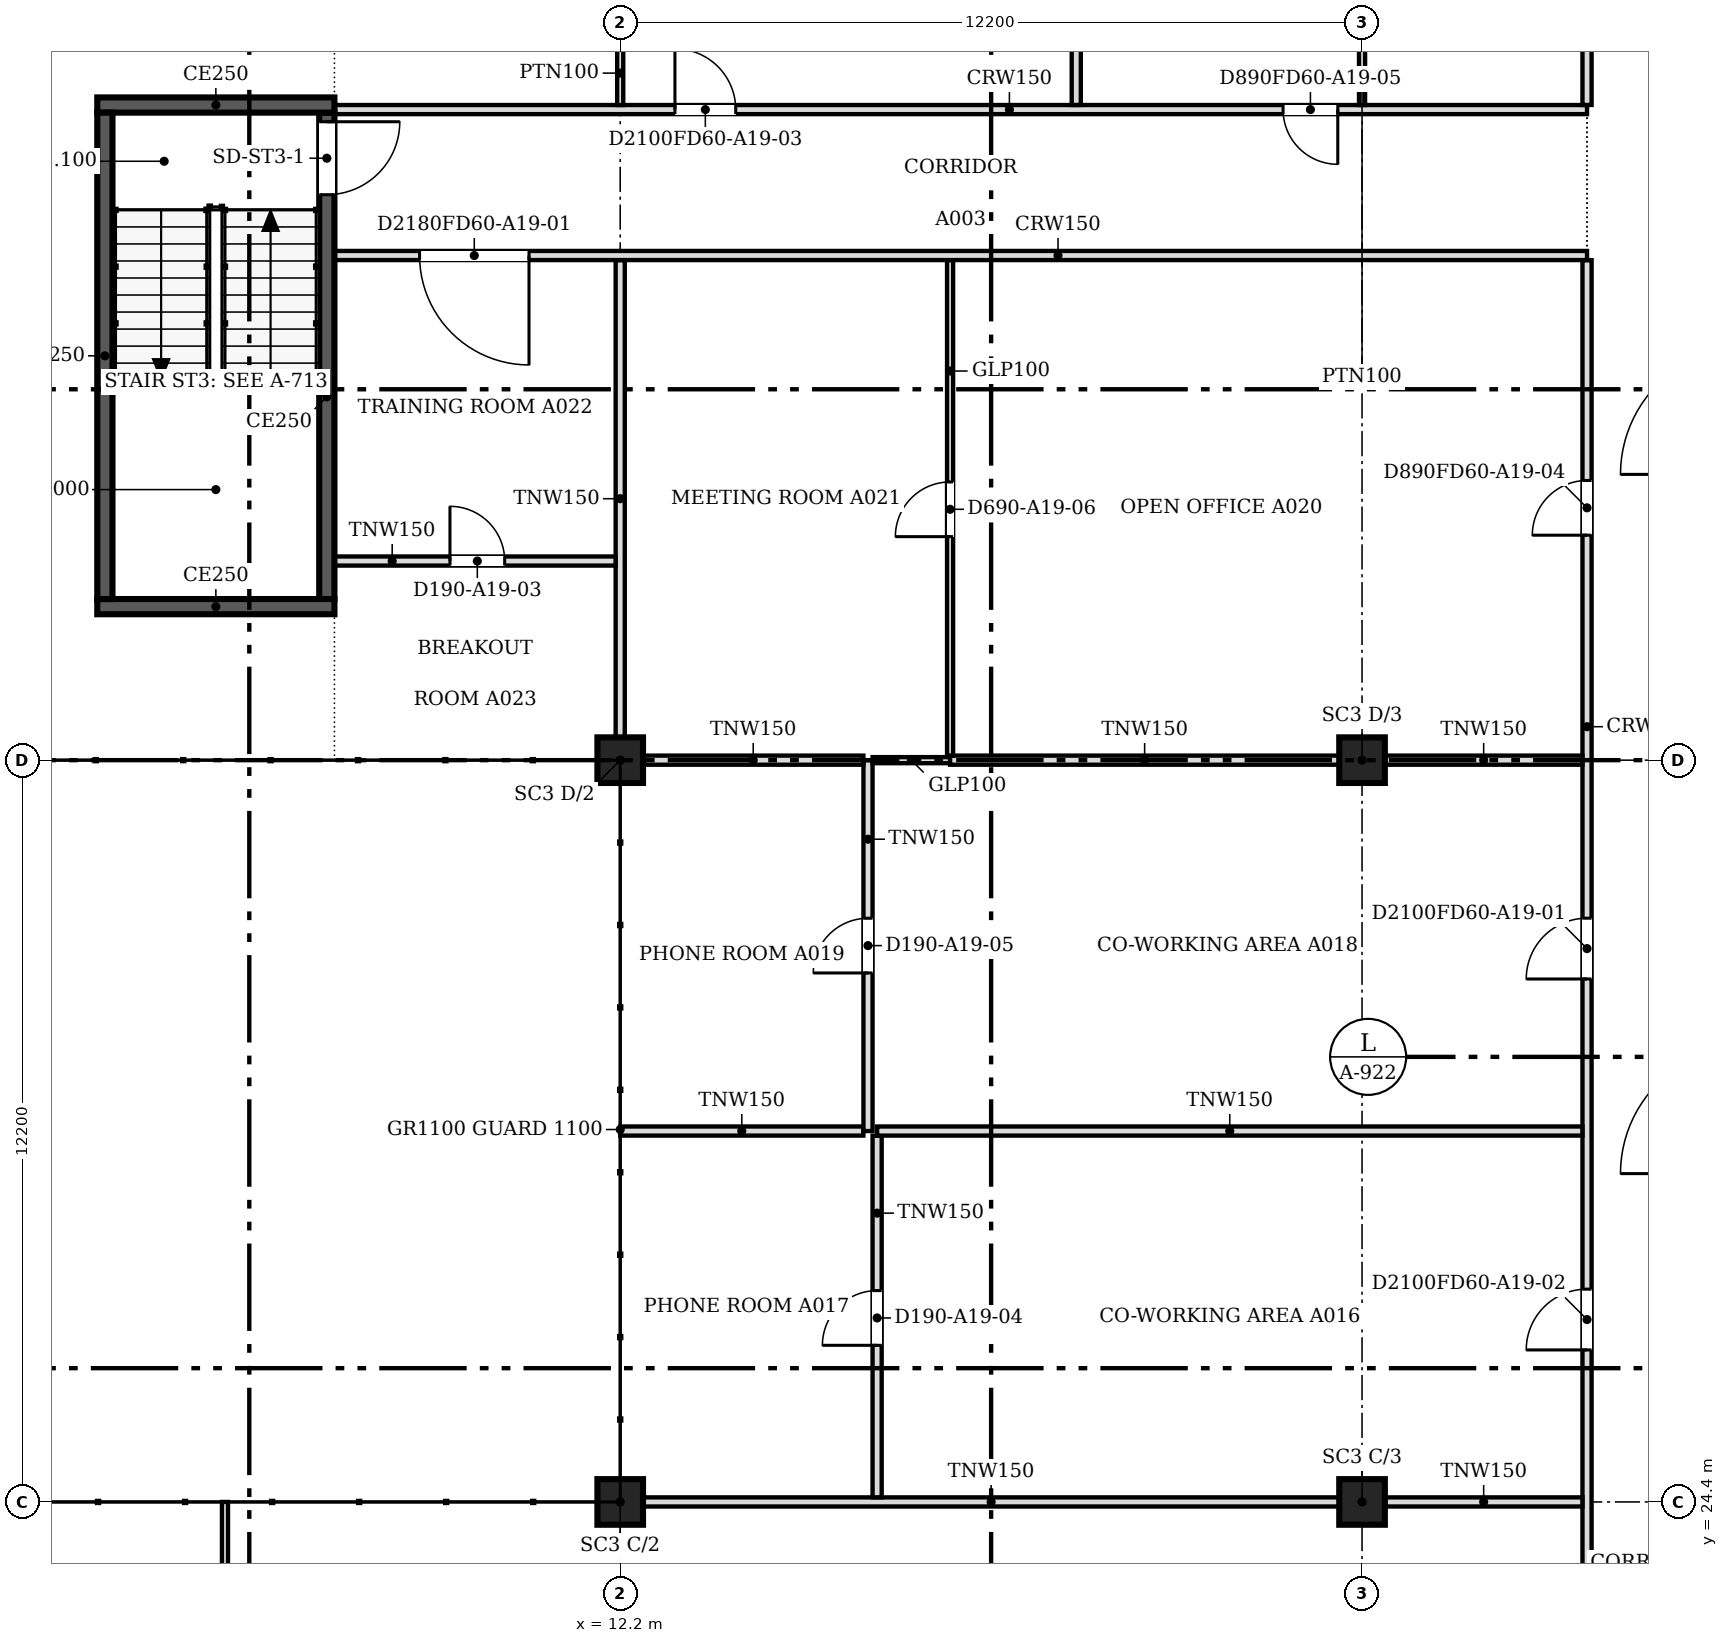
"""IFC4 building model, lengths in metres.
Left out: names, types, materials, properties, quantities, classifications, styles, units other than length and angle.
Written with IfcOpenShell. Run it as: python <this file> out.ifc"""

import sys

from ifc_helpers import new_model, si_unit, direction, frame, frame_2d, origin, origin_2d, place, context, subcontext, project, spatial, rectangle, extrude, source, transform, mapped, element, fill, save


model = new_model("IFC4")
c1 = context("Model", 3, precision=1e-05, world=origin(), true_north=direction((0.0, 1.0)))
c2 = subcontext(c1, "Body", "Model", "MODEL_VIEW")
j1 = project(units=[si_unit("LENGTHUNIT", "METRE"), si_unit("PLANEANGLEUNIT", "RADIAN")], contexts=[c1])
p1 = place(None, origin())
s1 = spatial("IfcSite", under=j1, at=p1, CompositionType="ELEMENT")
p2 = place(p1, origin())
s2 = spatial("IfcBuilding", under=s1, at=p2, CompositionType="ELEMENT")
p3 = place(p2, frame((0.0, 0.0, 209.3)))
s3 = spatial("IfcBuildingStorey", under=s2, at=p3, CompositionType="ELEMENT", Elevation=209.3)
for number, where, z_axis, x_axis in (
    (1, (12.2, 24.4, 0.0), (0.0, 0.0, 1.0), (1.0, 0.0, 0.0)),
    (2, (12.2, 36.6, 0.0), (0.0, 0.0, 1.0), (1.0, 0.0, 0.0)),
    (3, (24.4, 24.4, 0.0), (0.0, 0.0, 1.0), (1.0, 0.0, 0.0)),
    (4, (24.4, 36.6, 0.0), (0.0, 0.0, 1.0), (1.0, 0.0, 0.0)),
):
    element("IfcColumn", number, at=place(p3, frame(where, z_axis=z_axis, x_axis=x_axis)), inside=s3, PredefinedType="COLUMN", context=c2, shape_type="SweptSolid", body=[
        extrude(rectangle(XDim=0.75, YDim=0.75, at=origin_2d()), origin(), (0.0, 0.0, 1.0), 3.6),
    ])
p4 = place(p3, frame((7.5, 39.125, 0.0), z_axis=(0.0, 0.0, 1.0), x_axis=(-1.0, 0.0, 0.0)))
e5 = element("IfcWall", 5, at=p4, inside=s3, PredefinedType="SOLIDWALL", context=c2, shape_type="SweptSolid", body=[
    extrude(rectangle(XDim=3.9, YDim=0.25, at=frame_2d((1.95, 0.0))), origin(), (0.0, 0.0, 1.0), 3.8),
])
p5 = place(p3, frame((3.725, 39.25, 0.0), z_axis=(0.0, 0.0, 1.0), x_axis=(0.0, 1.0, 0.0)))
e6 = element("IfcWall", 6, at=p5, inside=s3, PredefinedType="SOLIDWALL", context=c2, shape_type="SweptSolid", body=[
    extrude(rectangle(XDim=8.0, YDim=0.25, at=frame_2d((4.0, 0.0))), origin(), (0.0, 0.0, 1.0), 3.8),
])
p6 = place(p3, frame((3.6, 47.375, 0.0), z_axis=(0.0, 0.0, 1.0), x_axis=(1.0, 0.0, 0.0)))
e7 = element("IfcWall", 7, at=p6, inside=s3, PredefinedType="SOLIDWALL", context=c2, shape_type="SweptSolid", body=[
    extrude(rectangle(XDim=3.9, YDim=0.25, at=frame_2d((1.95, 0.0))), origin(), (0.0, 0.0, 1.0), 3.8),
])
p7 = place(p3, frame((7.375, 47.25, 0.0), z_axis=(0.0, 0.0, 1.0), x_axis=(0.0, -1.0, 0.0)))
e8 = element("IfcWall", 8, at=p7, inside=s3, PredefinedType="SOLIDWALL", context=c2, shape_type="SweptSolid", body=[
    extrude(rectangle(XDim=8.0, YDim=0.25, at=frame_2d((4.0, 0.0))), origin(), (0.0, 0.0, 1.0), 3.8),
])
m1 = source(origin(), c2, "Body", "SweptSolid", [
    extrude(rectangle(XDim=1.2, YDim=2.1, at=frame_2d((0.6, 1.05))), frame((0.0, 0.135, 0.0), z_axis=(0.0, -1.0, 0.0), x_axis=(1.0, 0.0, 0.0)), (0.0, 0.0, 1.0), 0.27),
])
p8 = place(p7, frame((0.15, 0.0, 0.0)))
e9 = element("IfcOpeningElement", 9, at=p8, cuts=e8, PredefinedType="OPENING", context=c2, shape_type="MappedRepresentation", body=[
    mapped(m1, transform((0.0, 0.0, 0.0), scale=1.0)),
])
p9 = place(p3, frame((28.1, 18.8, 0.0), z_axis=(0.0, 0.0, 1.0), x_axis=(0.0, 1.0, 0.0)))
e10 = element("IfcWall", 10, at=p9, inside=s3, PredefinedType="PARTITIONING", context=c2, shape_type="SweptSolid", body=[
    extrude(rectangle(XDim=26.024, YDim=0.15, at=frame_2d((13.012, 0.0))), origin(), (0.0, 0.0, 1.0), 3.067),
])
m2 = source(origin(), c2, "Body", "SweptSolid", [
    extrude(rectangle(XDim=0.9, YDim=2.1, at=frame_2d((0.45, 1.05))), frame((0.0, 0.085, 0.0), z_axis=(0.0, -1.0, 0.0), x_axis=(1.0, 0.0, 0.0)), (0.0, 0.0, 1.0), 0.17),
])
p10 = place(p9, frame((1.1, 0.0, 0.0)))
e11 = element("IfcOpeningElement", 11, at=p10, cuts=e10, PredefinedType="OPENING", context=c2, shape_type="MappedRepresentation", body=[
    mapped(m2, transform((0.0, 0.0, 0.0), scale=1.0)),
])
m3 = source(origin(), c2, "Body", "SweptSolid", [
    extrude(rectangle(XDim=1.0, YDim=2.1, at=frame_2d((0.5, 1.05))), frame((0.0, 0.085, 0.0), z_axis=(0.0, -1.0, 0.0), x_axis=(1.0, 0.0, 0.0)), (0.0, 0.0, 1.0), 0.17),
])
p11 = place(p9, frame((14.201, 0.0, 0.0)))
e12 = element("IfcOpeningElement", 12, at=p11, cuts=e10, PredefinedType="OPENING", context=c2, shape_type="MappedRepresentation", body=[
    mapped(m3, transform((0.0, 0.0, 0.0), scale=1.0)),
])
p12 = place(p9, frame((8.1, 0.0, 0.0)))
e13 = element("IfcOpeningElement", 13, at=p12, cuts=e10, PredefinedType="OPENING", context=c2, shape_type="MappedRepresentation", body=[
    mapped(m3, transform((0.0, 0.0, 0.0), scale=1.0)),
])
p13 = place(p9, frame((21.5, 0.0, 0.0)))
e14 = element("IfcOpeningElement", 14, at=p13, cuts=e10, PredefinedType="OPENING", context=c2, shape_type="MappedRepresentation", body=[
    mapped(m2, transform((0.0, 0.0, 0.0), scale=1.0)),
])
p14 = place(p3, frame((5.7, 18.99, 0.0), z_axis=(0.0, 0.0, 1.0), x_axis=(0.0, 1.0, 0.0)))
e15 = element("IfcWall", 15, at=p14, inside=s3, PredefinedType="PARTITIONING", context=c2, shape_type="SweptSolid", body=[
    extrude(rectangle(XDim=5.41, YDim=0.1, at=frame_2d((2.705, 0.0))), origin(), (0.0, 0.0, 1.0), 3.067),
])
m4 = source(origin(), c2, "Body", "SweptSolid", [
    extrude(rectangle(XDim=0.9, YDim=2.1, at=frame_2d((0.45, 1.05))), frame((0.0, 0.06, 0.0), z_axis=(0.0, -1.0, 0.0), x_axis=(1.0, 0.0, 0.0)), (0.0, 0.0, 1.0), 0.12),
])
p15 = place(p14, frame((2.3, 0.0, 0.0)))
e16 = element("IfcOpeningElement", 16, at=p15, cuts=e15, PredefinedType="OPENING", context=c2, shape_type="MappedRepresentation", body=[
    mapped(m4, transform((0.0, 0.0, 0.0), scale=1.0)),
])
p16 = place(p3, frame((12.576, 24.4, 0.0), z_axis=(0.0, 0.0, 1.0), x_axis=(1.0, 0.0, 0.0)))
e17 = element("IfcWall", 17, at=p16, inside=s3, PredefinedType="PARTITIONING", context=c2, shape_type="SweptSolid", body=[
    extrude(rectangle(XDim=11.448, YDim=0.15, at=frame_2d((5.724, 0.0))), origin(), (0.0, 0.0, 1.0), 3.067),
])
p17 = place(p3, frame((24.776, 24.4, 0.0), z_axis=(0.0, 0.0, 1.0), x_axis=(1.0, 0.0, 0.0)))
e18 = element("IfcWall", 18, at=p17, inside=s3, PredefinedType="PARTITIONING", context=c2, shape_type="SweptSolid", body=[
    extrude(rectangle(XDim=3.248, YDim=0.15, at=frame_2d((1.624, 0.0))), origin(), (0.0, 0.0, 1.0), 3.067),
])
p18 = place(p3, frame((16.425, 24.476, 0.0), z_axis=(0.0, 0.0, 1.0), x_axis=(0.0, 1.0, 0.0)))
e19 = element("IfcWall", 19, at=p18, inside=s3, PredefinedType="PARTITIONING", context=c2, shape_type="SweptSolid", body=[
    extrude(rectangle(XDim=5.948, YDim=0.15, at=frame_2d((2.974, 0.0))), origin(), (0.0, 0.0, 1.0), 3.067),
])
p19 = place(p18, frame((2.5, 0.0, 0.0)))
e20 = element("IfcOpeningElement", 20, at=p19, cuts=e19, PredefinedType="OPENING", context=c2, shape_type="MappedRepresentation", body=[
    mapped(m2, transform((0.0, 0.0, 0.0), scale=1.0)),
])
p20 = place(p3, frame((12.2, 30.5, 0.0), z_axis=(0.0, 0.0, 1.0), x_axis=(1.0, 0.0, 0.0)))
e21 = element("IfcWall", 21, at=p20, inside=s3, PredefinedType="PARTITIONING", context=c2, shape_type="SweptSolid", body=[
    extrude(rectangle(XDim=3.999, YDim=0.15, at=frame_2d((2.0, 0.0))), origin(), (0.0, 0.0, 1.0), 3.067),
])
p21 = place(p3, frame((16.275, 30.5, 0.0), z_axis=(0.0, 0.0, 1.0), x_axis=(0.0, 1.0, 0.0)))
e22 = element("IfcWall", 22, at=p21, inside=s3, PredefinedType="PARTITIONING", context=c2, shape_type="SweptSolid", body=[
    extrude(rectangle(XDim=6.1, YDim=0.15, at=frame_2d((3.05, 0.0))), origin(), (0.0, 0.0, 1.0), 3.067),
])
p22 = place(p21, frame((2.6, 0.0, 0.0)))
e23 = element("IfcOpeningElement", 23, at=p22, cuts=e22, PredefinedType="OPENING", context=c2, shape_type="MappedRepresentation", body=[
    mapped(m2, transform((0.0, 0.0, 0.0), scale=1.0)),
])
p23 = place(p3, frame((16.425, 30.5, 0.0), z_axis=(0.0, 0.0, 1.0), x_axis=(1.0, 0.0, 0.0)))
e24 = element("IfcWall", 24, at=p23, inside=s3, PredefinedType="PARTITIONING", context=c2, shape_type="SweptSolid", body=[
    extrude(rectangle(XDim=11.599, YDim=0.15, at=frame_2d((5.799, 0.0))), origin(), (0.0, 0.0, 1.0), 3.067),
])
p24 = place(p3, frame((12.576, 36.6, 0.0), z_axis=(0.0, 0.0, 1.0), x_axis=(1.0, 0.0, 0.0)))
e25 = element("IfcWall", 25, at=p24, inside=s3, PredefinedType="PARTITIONING", context=c2, shape_type="SweptSolid", body=[
    extrude(rectangle(XDim=3.623, YDim=0.15, at=frame_2d((1.812, 0.0))), origin(), (0.0, 0.0, 1.0), 3.067),
])
p25 = place(p3, frame((16.351, 36.6, 0.0), z_axis=(0.0, 0.0, 1.0), x_axis=(1.0, 0.0, 0.0)))
e26 = element("IfcWall", 26, at=p25, inside=s3, PredefinedType="PARTITIONING", context=c2, shape_type="SweptSolid", body=[
    extrude(rectangle(XDim=1.273, YDim=0.1, at=frame_2d((0.636, 0.0))), origin(), (0.0, 0.0, 1.0), 3.067),
])
p26 = place(p3, frame((17.625, 36.6, 0.0), z_axis=(0.0, 0.0, 1.0), x_axis=(1.0, 0.0, 0.0)))
e27 = element("IfcWall", 27, at=p26, inside=s3, PredefinedType="PARTITIONING", context=c2, shape_type="SweptSolid", body=[
    extrude(rectangle(XDim=6.399, YDim=0.15, at=frame_2d((3.199, 0.0))), origin(), (0.0, 0.0, 1.0), 3.067),
])
p27 = place(p3, frame((24.776, 36.6, 0.0), z_axis=(0.0, 0.0, 1.0), x_axis=(1.0, 0.0, 0.0)))
e28 = element("IfcWall", 28, at=p27, inside=s3, PredefinedType="PARTITIONING", context=c2, shape_type="SweptSolid", body=[
    extrude(rectangle(XDim=3.248, YDim=0.15, at=frame_2d((1.624, 0.0))), origin(), (0.0, 0.0, 1.0), 3.067),
])
p28 = place(p3, frame((17.625, 36.676, 0.0), z_axis=(0.0, 0.0, 1.0), x_axis=(0.0, 1.0, 0.0)))
e29 = element("IfcWall", 29, at=p28, inside=s3, PredefinedType="PARTITIONING", context=c2, shape_type="SweptSolid", body=[
    extrude(rectangle(XDim=8.148, YDim=0.1, at=frame_2d((4.074, 0.0))), origin(), (0.0, 0.0, 1.0), 3.067),
])
p29 = place(p28, frame((3.6, 0.0, 0.0)))
e30 = element("IfcOpeningElement", 30, at=p29, cuts=e29, PredefinedType="OPENING", context=c2, shape_type="MappedRepresentation", body=[
    mapped(m4, transform((0.0, 0.0, 0.0), scale=1.0)),
])
p30 = place(p3, frame((12.2, 36.976, 0.0), z_axis=(0.0, 0.0, 1.0), x_axis=(0.0, 1.0, 0.0)))
e31 = element("IfcWall", 31, at=p30, inside=s3, PredefinedType="PARTITIONING", context=c2, shape_type="SweptSolid", body=[
    extrude(rectangle(XDim=7.848, YDim=0.15, at=frame_2d((3.924, 0.0))), origin(), (0.0, 0.0, 1.0), 3.067),
])
p31 = place(p3, frame((12.124, 39.875, 0.0), z_axis=(0.0, 0.0, 1.0), x_axis=(-1.0, 0.0, 0.0)))
e32 = element("IfcWall", 32, at=p31, inside=s3, PredefinedType="PARTITIONING", context=c2, shape_type="SweptSolid", body=[
    extrude(rectangle(XDim=4.624, YDim=0.15, at=frame_2d((2.312, 0.0))), origin(), (0.0, 0.0, 1.0), 3.067),
])
p32 = place(p31, frame((1.824, 0.0, 0.0)))
e33 = element("IfcOpeningElement", 33, at=p32, cuts=e32, PredefinedType="OPENING", context=c2, shape_type="MappedRepresentation", body=[
    mapped(m2, transform((0.0, 0.0, 0.0), scale=1.0)),
])
p33 = place(p3, frame((28.1, 44.9, 0.0), z_axis=(0.0, 0.0, 1.0), x_axis=(-1.0, 0.0, 0.0)))
e34 = element("IfcWall", 34, at=p33, inside=s3, PredefinedType="PARTITIONING", context=c2, shape_type="SweptSolid", body=[
    extrude(rectangle(XDim=20.6, YDim=0.15, at=frame_2d((10.3, 0.0))), origin(), (0.0, 0.0, 1.0), 3.067),
])
m5 = source(origin(), c2, "Body", "SweptSolid", [
    extrude(rectangle(XDim=1.8, YDim=2.1, at=frame_2d((0.9, 1.05))), frame((0.0, 0.085, 0.0), z_axis=(0.0, -1.0, 0.0), x_axis=(1.0, 0.0, 0.0)), (0.0, 0.0, 1.0), 0.17),
])
p34 = place(p33, frame((17.4, 0.0, 0.0)))
e35 = element("IfcOpeningElement", 35, at=p34, cuts=e34, PredefinedType="OPENING", context=c2, shape_type="MappedRepresentation", body=[
    mapped(m5, transform((0.0, 0.0, 0.0), scale=1.0)),
])
p35 = place(p3, frame((7.5, 47.3, 0.0), z_axis=(0.0, 0.0, 1.0), x_axis=(1.0, 0.0, 0.0)))
e36 = element("IfcWall", 36, at=p35, inside=s3, PredefinedType="PARTITIONING", context=c2, shape_type="SweptSolid", body=[
    extrude(rectangle(XDim=20.6, YDim=0.15, at=frame_2d((10.3, 0.0))), origin(), (0.0, 0.0, 1.0), 3.067),
])
p36 = place(p35, frame((15.601, 0.0, 0.0)))
e37 = element("IfcOpeningElement", 37, at=p36, cuts=e36, PredefinedType="OPENING", context=c2, shape_type="MappedRepresentation", body=[
    mapped(m2, transform((0.0, 0.0, 0.0), scale=1.0)),
])
p37 = place(p35, frame((5.6, 0.0, 0.0)))
e38 = element("IfcOpeningElement", 38, at=p37, cuts=e36, PredefinedType="OPENING", context=c2, shape_type="MappedRepresentation", body=[
    mapped(m3, transform((0.0, 0.0, 0.0), scale=1.0)),
])
p38 = place(p3, frame((19.7, 47.376, 0.0), z_axis=(0.0, 0.0, 1.0), x_axis=(0.0, 1.0, 0.0)))
e39 = element("IfcWall", 39, at=p38, inside=s3, PredefinedType="PARTITIONING", context=c2, shape_type="SweptSolid", body=[
    extrude(rectangle(XDim=3.274, YDim=0.15, at=frame_2d((1.637, 0.0))), origin(), (0.0, 0.0, 1.0), 3.067),
])
p39 = place(p3, frame((28.1, 47.376, 0.0), z_axis=(0.0, 0.0, 1.0), x_axis=(0.0, 1.0, 0.0)))
e40 = element("IfcWall", 40, at=p39, inside=s3, PredefinedType="PARTITIONING", context=c2, shape_type="SweptSolid", body=[
    extrude(rectangle(XDim=3.748, YDim=0.15, at=frame_2d((1.874, 0.0))), origin(), (0.0, 0.0, 1.0), 3.067),
])
for number, where, z_axis, x_axis in (
    (41, (12.2, 48.425, 0.0), (0.0, 0.0, 1.0), (0.0, -1.0, 0.0)),
    (42, (24.4, 48.425, 0.0), (0.0, 0.0, 1.0), (0.0, -1.0, 0.0)),
):
    element("IfcWall", number, at=place(p3, frame(where, z_axis=z_axis, x_axis=x_axis)), inside=s3, PredefinedType="PARTITIONING", context=c2, shape_type="SweptSolid", body=[
        extrude(rectangle(XDim=1.05, YDim=0.1, at=frame_2d((0.525, 0.0))), origin(), (0.0, 0.0, 1.0), 3.067),
    ])
m6 = source(origin(), c2, "Body", "SweptSolid", [
    extrude(rectangle(XDim=1.2, YDim=2.1, at=frame_2d((0.6, 1.05))), frame((0.0, 0.025, 0.0), z_axis=(0.0, -1.0, 0.0), x_axis=(1.0, 0.0, 0.0)), (0.0, 0.0, 1.0), 0.05),
])
p40 = place(p8, origin())
e43 = element("IfcDoor", 43, at=p40, inside=s3, OperationType="SINGLE_SWING_LEFT", PredefinedType="DOOR", context=c2, shape_type="MappedRepresentation", body=[
    mapped(m6, transform((0.0, 0.0, 0.0), scale=1.0)),
])
fill(e9, e43)
m7 = source(origin(), c2, "Body", "SweptSolid", [
    extrude(rectangle(XDim=0.9, YDim=2.1, at=frame_2d((0.45, 1.05))), frame((0.0, 0.025, 0.0), z_axis=(0.0, -1.0, 0.0), x_axis=(1.0, 0.0, 0.0)), (0.0, 0.0, 1.0), 0.05),
])
p41 = place(p32, origin())
e44 = element("IfcDoor", 44, at=p41, inside=s3, OperationType="SINGLE_SWING_RIGHT", PredefinedType="DOOR", context=c2, shape_type="MappedRepresentation", body=[
    mapped(m7, transform((0.0, 0.0, 0.0), scale=1.0)),
])
fill(e33, e44)
m8 = source(origin(), c2, "Body", "SweptSolid", [
    extrude(rectangle(XDim=1.8, YDim=2.1, at=frame_2d((0.9, 1.05))), frame((0.0, 0.025, 0.0), z_axis=(0.0, -1.0, 0.0), x_axis=(1.0, 0.0, 0.0)), (0.0, 0.0, 1.0), 0.05),
])
p42 = place(p34, origin())
e45 = element("IfcDoor", 45, at=p42, inside=s3, OperationType="DOUBLE_DOOR_SINGLE_SWING", PredefinedType="DOOR", context=c2, shape_type="MappedRepresentation", body=[
    mapped(m8, transform((0.0, 0.0, 0.0), scale=1.0)),
])
fill(e35, e45)
p43 = place(p19, origin())
e46 = element("IfcDoor", 46, at=p43, inside=s3, OperationType="SINGLE_SWING_LEFT", PredefinedType="DOOR", context=c2, shape_type="MappedRepresentation", body=[
    mapped(m7, transform((0.0, 0.0, 0.0), scale=1.0)),
])
fill(e20, e46)
m9 = source(origin(), c2, "Body", "SweptSolid", [
    extrude(rectangle(XDim=1.0, YDim=2.1, at=frame_2d((0.5, 1.05))), frame((0.0, 0.025, 0.0), z_axis=(0.0, -1.0, 0.0), x_axis=(1.0, 0.0, 0.0)), (0.0, 0.0, 1.0), 0.05),
])
p44 = place(p11, origin())
e47 = element("IfcDoor", 47, at=p44, inside=s3, OperationType="SINGLE_SWING_LEFT", PredefinedType="DOOR", context=c2, shape_type="MappedRepresentation", body=[
    mapped(m9, transform((0.0, 0.0, 0.0), scale=1.0)),
])
fill(e12, e47)
p45 = place(p12, origin())
e48 = element("IfcDoor", 48, at=p45, inside=s3, OperationType="SINGLE_SWING_LEFT", PredefinedType="DOOR", context=c2, shape_type="MappedRepresentation", body=[
    mapped(m9, transform((0.0, 0.0, 0.0), scale=1.0)),
])
fill(e13, e48)
p46 = place(p22, origin())
e49 = element("IfcDoor", 49, at=p46, inside=s3, OperationType="SINGLE_SWING_LEFT", PredefinedType="DOOR", context=c2, shape_type="MappedRepresentation", body=[
    mapped(m7, transform((0.0, 0.0, 0.0), scale=1.0)),
])
fill(e23, e49)
p47 = place(p29, origin())
e50 = element("IfcDoor", 50, at=p47, inside=s3, OperationType="SINGLE_SWING_LEFT", PredefinedType="DOOR", context=c2, shape_type="MappedRepresentation", body=[
    mapped(m7, transform((0.0, 0.0, 0.0), scale=1.0)),
])
fill(e30, e50)
p48 = place(p13, origin())
e51 = element("IfcDoor", 51, at=p48, inside=s3, OperationType="SINGLE_SWING_LEFT", PredefinedType="DOOR", context=c2, shape_type="MappedRepresentation", body=[
    mapped(m7, transform((0.0, 0.0, 0.0), scale=1.0)),
])
fill(e14, e51)
p49 = place(p36, origin())
e52 = element("IfcDoor", 52, at=p49, inside=s3, OperationType="SINGLE_SWING_RIGHT", PredefinedType="DOOR", context=c2, shape_type="MappedRepresentation", body=[
    mapped(m7, transform((0.0, 0.0, 0.0), scale=1.0)),
])
fill(e37, e52)
p50 = place(p37, origin())
e53 = element("IfcDoor", 53, at=p50, inside=s3, OperationType="SINGLE_SWING_LEFT", PredefinedType="DOOR", context=c2, shape_type="MappedRepresentation", body=[
    mapped(m9, transform((0.0, 0.0, 0.0), scale=1.0)),
])
fill(e38, e53)
save(model, sys.argv[1])
